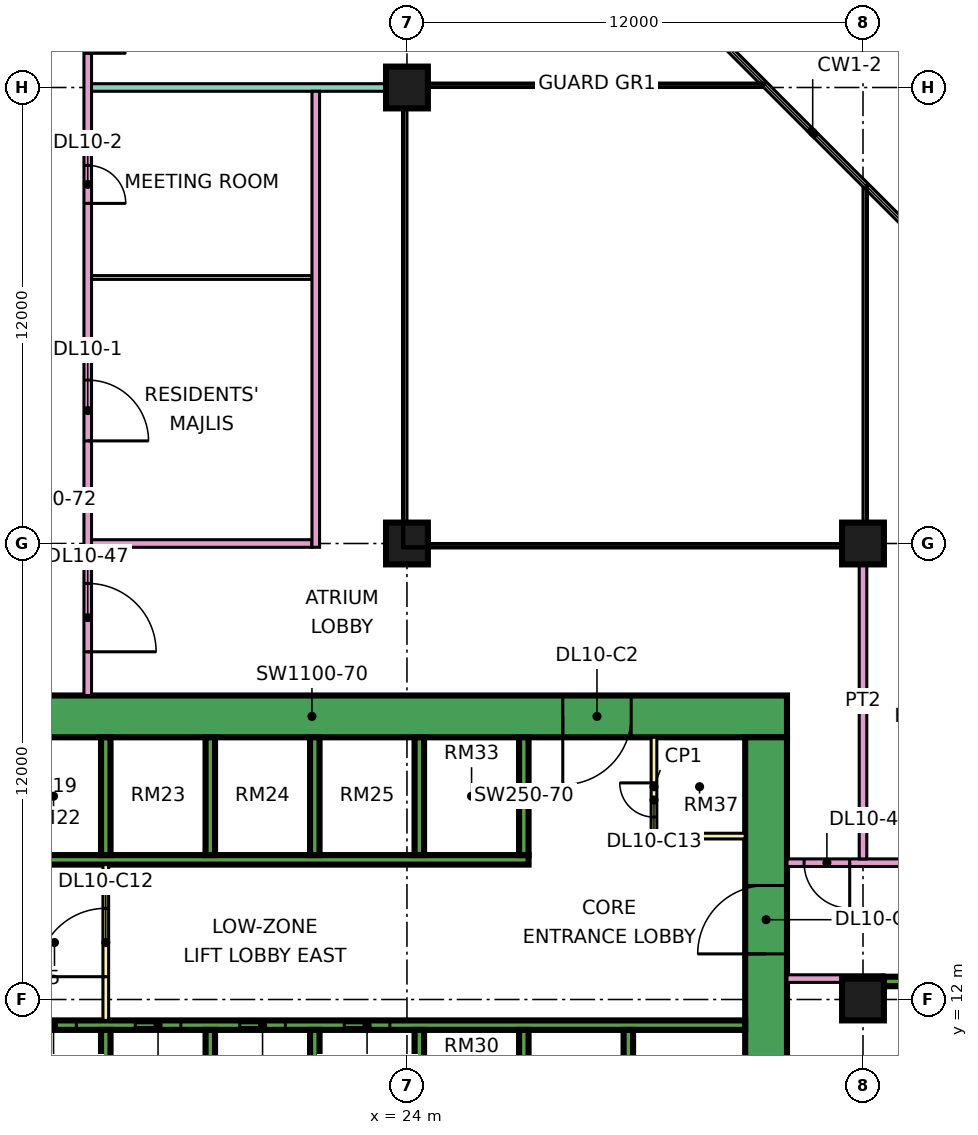
"""IFC4 building model, lengths in metres.
Left out: names, types, materials, properties, quantities, classifications, styles, units other than length and angle.
Written with IfcOpenShell. Run it as: python <this file> out.ifc"""

import sys

from ifc_helpers import new_model, si_unit, direction, frame, frame_2d, origin, origin_2d, place, context, subcontext, project, spatial, rectangle, extrude, element, fill, save


model = new_model("IFC4")
c1 = context("Model", 3, precision=1e-05, world=origin(), true_north=direction((0.0, 1.0)))
c2 = subcontext(c1, "Body", "Model", "MODEL_VIEW")
j1 = project(units=[si_unit("LENGTHUNIT", "METRE"), si_unit("PLANEANGLEUNIT", "RADIAN")], contexts=[c1])
p1 = place(None, origin())
s1 = spatial("IfcSite", under=j1, at=p1, CompositionType="ELEMENT")
p2 = place(p1, origin())
s2 = spatial("IfcBuilding", under=s1, at=p2, CompositionType="ELEMENT")
p3 = place(p2, frame((0.0, 0.0, 52.65)))
s3 = spatial("IfcBuildingStorey", under=s2, at=p3, CompositionType="ELEMENT", Elevation=52.65)
for number, where, z_axis, x_axis in (
    (1, (24.0, 24.0, 0.0), (0.0, 0.0, 1.0), (1.0, 0.0, 0.0)),
    (2, (24.0, 36.0, 0.0), (0.0, 0.0, 1.0), (1.0, 0.0, 0.0)),
    (3, (36.0, 12.0, 0.0), (0.0, 0.0, 1.0), (1.0, 0.0, 0.0)),
    (4, (36.0, 24.0, 0.0), (0.0, 0.0, 1.0), (1.0, 0.0, 0.0)),
):
    element("IfcColumn", number, at=place(p3, frame(where, z_axis=z_axis, x_axis=x_axis)), inside=s3, PredefinedType="COLUMN", context=c2, shape_type="SweptSolid", body=[
        extrude(rectangle(XDim=1.1, YDim=1.1, at=origin_2d()), origin(), (0.0, 0.0, 1.0), 3.75),
    ])
p4 = place(p3, frame((9.0, 19.45, 0.0), z_axis=(0.0, 0.0, 1.0), x_axis=(1.0, 0.0, 0.0)))
e5 = element("IfcWall", 5, at=p4, inside=s3, PredefinedType="SHEAR", context=c2, shape_type="SweptSolid", body=[
    extrude(rectangle(XDim=25.0, YDim=1.1, at=frame_2d((12.5, 0.0))), origin(), (0.0, 0.0, 1.0), 3.75),
])
p5 = place(p4, frame((19.1, 0.0, 0.0)))
e6 = element("IfcOpeningElement", 6, at=p5, cuts=e5, PredefinedType="OPENING", context=c2, shape_type="SweptSolid", body=[
    extrude(rectangle(XDim=1.8, YDim=2.4, at=frame_2d((0.9, 1.2))), frame((0.0, 0.56, 0.0), z_axis=(0.0, -1.0, 0.0), x_axis=(1.0, 0.0, 0.0)), (0.0, 0.0, 1.0), 1.12),
])
p6 = place(p3, frame((33.45, 8.1, 0.0), z_axis=(0.0, 0.0, 1.0), x_axis=(0.0, 1.0, 0.0)))
e7 = element("IfcWall", 7, at=p6, inside=s3, PredefinedType="SHEAR", context=c2, shape_type="SweptSolid", body=[
    extrude(rectangle(XDim=10.8, YDim=1.1, at=frame_2d((5.4, 0.0))), origin(), (0.0, 0.0, 1.0), 3.75),
])
p7 = place(p6, frame((5.1, 0.0, 0.0)))
e8 = element("IfcOpeningElement", 8, at=p7, cuts=e7, PredefinedType="OPENING", context=c2, shape_type="SweptSolid", body=[
    extrude(rectangle(XDim=1.8, YDim=2.4, at=frame_2d((0.9, 1.2))), frame((0.0, 0.56, 0.0), z_axis=(0.0, -1.0, 0.0), x_axis=(1.0, 0.0, 0.0)), (0.0, 0.0, 1.0), 1.12),
])
p8 = place(p3, frame((13.45, 11.325, 0.0), z_axis=(0.0, 0.0, 1.0), x_axis=(1.0, 0.0, 0.0)))
e9 = element("IfcWall", 9, at=p8, inside=s3, PredefinedType="SHEAR", context=c2, shape_type="SweptSolid", body=[
    extrude(rectangle(XDim=19.45, YDim=0.25, at=frame_2d((9.725, 0.0))), origin(), (0.0, 0.0, 1.0), 3.75),
])
p9 = place(p8, frame((0.65, 0.0, 0.0)))
e10 = element("IfcOpeningElement", 10, at=p9, cuts=e9, PredefinedType="OPENING", context=c2, shape_type="SweptSolid", body=[
    extrude(rectangle(XDim=1.2, YDim=2.2, at=frame_2d((0.6, 1.1))), frame((0.0, 0.135, 0.0), z_axis=(0.0, -1.0, 0.0), x_axis=(1.0, 0.0, 0.0)), (0.0, 0.0, 1.0), 0.27),
])
p10 = place(p8, frame((3.4, 0.0, 0.0)))
e11 = element("IfcOpeningElement", 11, at=p10, cuts=e9, PredefinedType="OPENING", context=c2, shape_type="SweptSolid", body=[
    extrude(rectangle(XDim=1.2, YDim=2.2, at=frame_2d((0.6, 1.1))), frame((0.0, 0.135, 0.0), z_axis=(0.0, -1.0, 0.0), x_axis=(1.0, 0.0, 0.0)), (0.0, 0.0, 1.0), 0.27),
])
p11 = place(p8, frame((6.15, 0.0, 0.0)))
e12 = element("IfcOpeningElement", 12, at=p11, cuts=e9, PredefinedType="OPENING", context=c2, shape_type="SweptSolid", body=[
    extrude(rectangle(XDim=1.2, YDim=2.2, at=frame_2d((0.6, 1.1))), frame((0.0, 0.135, 0.0), z_axis=(0.0, -1.0, 0.0), x_axis=(1.0, 0.0, 0.0)), (0.0, 0.0, 1.0), 0.27),
])
p12 = place(p8, frame((8.9, 0.0, 0.0)))
e13 = element("IfcOpeningElement", 13, at=p12, cuts=e9, PredefinedType="OPENING", context=c2, shape_type="SweptSolid", body=[
    extrude(rectangle(XDim=1.2, YDim=2.2, at=frame_2d((0.6, 1.1))), frame((0.0, 0.135, 0.0), z_axis=(0.0, -1.0, 0.0), x_axis=(1.0, 0.0, 0.0)), (0.0, 0.0, 1.0), 0.27),
])
p13 = place(p3, frame((13.45, 15.675, 0.0), z_axis=(0.0, 0.0, 1.0), x_axis=(1.0, 0.0, 0.0)))
e14 = element("IfcWall", 14, at=p13, inside=s3, PredefinedType="SHEAR", context=c2, shape_type="SweptSolid", body=[
    extrude(rectangle(XDim=13.75, YDim=0.25, at=frame_2d((6.875, 0.0))), origin(), (0.0, 0.0, 1.0), 3.75),
])
for number, where, z_axis, x_axis in (
    (15, (16.075, 8.1, 0.0), (0.0, 0.0, 1.0), (0.0, 1.0, 0.0)),
    (16, (18.825, 8.1, 0.0), (0.0, 0.0, 1.0), (0.0, 1.0, 0.0)),
    (17, (21.575, 8.1, 0.0), (0.0, 0.0, 1.0), (0.0, 1.0, 0.0)),
    (18, (24.325, 8.1, 0.0), (0.0, 0.0, 1.0), (0.0, 1.0, 0.0)),
    (19, (27.075, 8.1, 0.0), (0.0, 0.0, 1.0), (0.0, 1.0, 0.0)),
    (20, (29.825, 8.1, 0.0), (0.0, 0.0, 1.0), (0.0, 1.0, 0.0)),
    (21, (16.075, 15.8, 0.0), (0.0, 0.0, 1.0), (0.0, 1.0, 0.0)),
    (22, (18.825, 15.8, 0.0), (0.0, 0.0, 1.0), (0.0, 1.0, 0.0)),
    (23, (21.575, 15.8, 0.0), (0.0, 0.0, 1.0), (0.0, 1.0, 0.0)),
    (24, (24.325, 15.8, 0.0), (0.0, 0.0, 1.0), (0.0, 1.0, 0.0)),
    (25, (27.075, 15.8, 0.0), (0.0, 0.0, 1.0), (0.0, 1.0, 0.0)),
):
    element("IfcWall", number, at=place(p3, frame(where, z_axis=z_axis, x_axis=x_axis)), inside=s3, PredefinedType="SHEAR", context=c2, shape_type="SweptSolid", body=[
        extrude(rectangle(XDim=3.1, YDim=0.25, at=frame_2d((1.55, 0.0))), origin(), (0.0, 0.0, 1.0), 3.75),
    ])
p14 = place(p3, frame((36.55, 12.475, 0.0), z_axis=(0.0, 0.0, 1.0), x_axis=(1.0, 0.0, 0.0)))
e26 = element("IfcWall", 26, at=p14, inside=s3, PredefinedType="SHEAR", context=c2, shape_type="SweptSolid", body=[
    extrude(rectangle(XDim=4.1, YDim=0.25, at=frame_2d((2.05, 0.0))), origin(), (0.0, 0.0, 1.0), 3.75),
])
p15 = place(p14, frame((1.825, 0.0, 0.0)))
e27 = element("IfcOpeningElement", 27, at=p15, cuts=e26, PredefinedType="OPENING", context=c2, shape_type="SweptSolid", body=[
    extrude(rectangle(XDim=1.1, YDim=2.2, at=frame_2d((0.55, 1.1))), frame((0.0, 0.135, 0.0), z_axis=(0.0, -1.0, 0.0), x_axis=(1.0, 0.0, 0.0)), (0.0, 0.0, 1.0), 0.27),
])
p16 = place(p3, frame((16.075, 11.45, 0.0), z_axis=(0.0, 0.0, 1.0), x_axis=(0.0, 1.0, 0.0)))
e28 = element("IfcWall", 28, at=p16, inside=s3, PredefinedType="PARTITIONING", context=c2, shape_type="SweptSolid", body=[
    extrude(rectangle(XDim=4.1, YDim=0.15, at=frame_2d((2.05, 0.0))), origin(), (0.0, 0.0, 1.0), 3.35),
])
p17 = place(p16, frame((1.15, 0.0, 0.0)))
e29 = element("IfcOpeningElement", 29, at=p17, cuts=e28, PredefinedType="OPENING", context=c2, shape_type="SweptSolid", body=[
    extrude(rectangle(XDim=1.8, YDim=2.4, at=frame_2d((0.9, 1.2))), frame((0.0, 0.085, 0.0), z_axis=(0.0, -1.0, 0.0), x_axis=(1.0, 0.0, 0.0)), (0.0, 0.0, 1.0), 0.17),
])
p18 = place(p3, frame((30.5, 16.3, 0.0), z_axis=(0.0, 0.0, 1.0), x_axis=(0.0, 1.0, 0.0)))
e30 = element("IfcWall", 30, at=p18, inside=s3, PredefinedType="PARTITIONING", context=c2, shape_type="SweptSolid", body=[
    extrude(rectangle(XDim=2.6, YDim=0.15, at=frame_2d((1.3, 0.0))), origin(), (0.0, 0.0, 1.0), 3.35),
])
p19 = place(p18, frame((0.5, 0.0, 0.0)))
e31 = element("IfcOpeningElement", 31, at=p19, cuts=e30, PredefinedType="OPENING", context=c2, shape_type="SweptSolid", body=[
    extrude(rectangle(XDim=0.9, YDim=2.1, at=frame_2d((0.45, 1.05))), frame((0.0, 0.085, 0.0), z_axis=(0.0, -1.0, 0.0), x_axis=(1.0, 0.0, 0.0)), (0.0, 0.0, 1.0), 0.17),
])
p20 = place(p3, frame((30.5, 16.3, 0.0), z_axis=(0.0, 0.0, 1.0), x_axis=(1.0, 0.0, 0.0)))
e32 = element("IfcWall", 32, at=p20, inside=s3, PredefinedType="PARTITIONING", context=c2, shape_type="SweptSolid", body=[
    extrude(rectangle(XDim=2.4, YDim=0.15, at=frame_2d((1.2, 0.0))), origin(), (0.0, 0.0, 1.0), 3.35),
])
p21 = place(p3, frame((15.6, 20.0, 0.0), z_axis=(0.0, 0.0, 1.0), x_axis=(0.0, 1.0, 0.0)))
e33 = element("IfcWall", 33, at=p21, inside=s3, PredefinedType="PARTITIONING", context=c2, shape_type="SweptSolid", body=[
    extrude(rectangle(XDim=27.775, YDim=0.2, at=frame_2d((13.887, 0.0))), origin(), (0.0, 0.0, 1.0), 3.35),
])
p22 = place(p21, frame((6.7, 0.0, 0.0)))
e34 = element("IfcOpeningElement", 34, at=p22, cuts=e33, PredefinedType="OPENING", context=c2, shape_type="SweptSolid", body=[
    extrude(rectangle(XDim=1.6, YDim=2.1, at=frame_2d((0.8, 1.05))), frame((0.0, 0.11, 0.0), z_axis=(0.0, -1.0, 0.0), x_axis=(1.0, 0.0, 0.0)), (0.0, 0.0, 1.0), 0.22),
])
p23 = place(p21, frame((12.95, 0.0, 0.0)))
e35 = element("IfcOpeningElement", 35, at=p23, cuts=e33, PredefinedType="OPENING", context=c2, shape_type="SweptSolid", body=[
    extrude(rectangle(XDim=1.0, YDim=2.1, at=frame_2d((0.5, 1.05))), frame((0.0, 0.11, 0.0), z_axis=(0.0, -1.0, 0.0), x_axis=(1.0, 0.0, 0.0)), (0.0, 0.0, 1.0), 0.22),
])
p24 = place(p21, frame((16.9, 0.0, 0.0)))
e36 = element("IfcOpeningElement", 36, at=p24, cuts=e33, PredefinedType="OPENING", context=c2, shape_type="SweptSolid", body=[
    extrude(rectangle(XDim=1.0, YDim=2.1, at=frame_2d((0.5, 1.05))), frame((0.0, 0.11, 0.0), z_axis=(0.0, -1.0, 0.0), x_axis=(1.0, 0.0, 0.0)), (0.0, 0.0, 1.0), 0.22),
])
p25 = place(p21, frame((1.15, 0.0, 0.0)))
e37 = element("IfcOpeningElement", 37, at=p25, cuts=e33, PredefinedType="OPENING", context=c2, shape_type="SweptSolid", body=[
    extrude(rectangle(XDim=1.8, YDim=2.1, at=frame_2d((0.9, 1.05))), frame((0.0, 0.11, 0.0), z_axis=(0.0, -1.0, 0.0), x_axis=(1.0, 0.0, 0.0)), (0.0, 0.0, 1.0), 0.22),
])
p26 = place(p21, frame((25.9, 0.0, 0.0)))
e38 = element("IfcOpeningElement", 38, at=p26, cuts=e33, PredefinedType="OPENING", context=c2, shape_type="SweptSolid", body=[
    extrude(rectangle(XDim=1.0, YDim=2.1, at=frame_2d((0.5, 1.05))), frame((0.0, 0.11, 0.0), z_axis=(0.0, -1.0, 0.0), x_axis=(1.0, 0.0, 0.0)), (0.0, 0.0, 1.0), 0.22),
])
p27 = place(p3, frame((15.7, 24.0, 0.0), z_axis=(0.0, 0.0, 1.0), x_axis=(1.0, 0.0, 0.0)))
e39 = element("IfcWall", 39, at=p27, inside=s3, PredefinedType="PARTITIONING", context=c2, shape_type="SweptSolid", body=[
    extrude(rectangle(XDim=5.8, YDim=0.2, at=frame_2d((2.9, 0.0))), origin(), (0.0, 0.0, 1.0), 3.35),
])
p28 = place(p3, frame((15.7, 31.0, 0.0), z_axis=(0.0, 0.0, 1.0), x_axis=(1.0, 0.0, 0.0)))
e40 = element("IfcWall", 40, at=p28, inside=s3, PredefinedType="PARTITIONING", context=c2, shape_type="SweptSolid", body=[
    extrude(rectangle(XDim=5.8, YDim=0.1, at=frame_2d((2.9, 0.0))), origin(), (0.0, 0.0, 1.0), 3.35),
])
p29 = place(p3, frame((15.7, 36.0, 0.0), z_axis=(0.0, 0.0, 1.0), x_axis=(1.0, 0.0, 0.0)))
e41 = element("IfcWall", 41, at=p29, inside=s3, PredefinedType="PARTITIONING", context=c2, shape_type="SweptSolid", body=[
    extrude(rectangle(XDim=8.3, YDim=0.2, at=frame_2d((4.15, 0.0))), origin(), (0.0, 0.0, 1.0), 3.35),
])
p30 = place(p3, frame((21.6, 23.9, 0.0), z_axis=(0.0, 0.0, 1.0), x_axis=(0.0, 1.0, 0.0)))
e42 = element("IfcWall", 42, at=p30, inside=s3, PredefinedType="PARTITIONING", context=c2, shape_type="SweptSolid", body=[
    extrude(rectangle(XDim=12.0, YDim=0.2, at=frame_2d((6.0, 0.0))), origin(), (0.0, 0.0, 1.0), 3.35),
])
p31 = place(p3, frame((34.0, 12.55, 0.0), z_axis=(0.0, 0.0, 1.0), x_axis=(1.0, 0.0, 0.0)))
e43 = element("IfcWall", 43, at=p31, inside=s3, PredefinedType="PARTITIONING", context=c2, shape_type="SweptSolid", body=[
    extrude(rectangle(XDim=2.551, YDim=0.2, at=frame_2d((1.275, 0.0))), origin(), (0.0, 0.0, 1.0), 3.35),
])
p32 = place(p3, frame((34.0, 15.6, 0.0), z_axis=(0.0, 0.0, 1.0), x_axis=(1.0, 0.0, 0.0)))
e44 = element("IfcWall", 44, at=p32, inside=s3, PredefinedType="PARTITIONING", context=c2, shape_type="SweptSolid", body=[
    extrude(rectangle(XDim=10.35, YDim=0.2, at=frame_2d((5.175, 0.0))), origin(), (0.0, 0.0, 1.0), 3.35),
])
p33 = place(p32, frame((5.6, 0.0, 0.0)))
e45 = element("IfcOpeningElement", 45, at=p33, cuts=e44, PredefinedType="OPENING", context=c2, shape_type="SweptSolid", body=[
    extrude(rectangle(XDim=1.0, YDim=2.1, at=frame_2d((0.5, 1.05))), frame((0.0, 0.11, 0.0), z_axis=(0.0, -1.0, 0.0), x_axis=(1.0, 0.0, 0.0)), (0.0, 0.0, 1.0), 0.22),
])
p34 = place(p32, frame((0.45, 0.0, 0.0)))
e46 = element("IfcOpeningElement", 46, at=p34, cuts=e44, PredefinedType="OPENING", context=c2, shape_type="SweptSolid", body=[
    extrude(rectangle(XDim=1.2, YDim=2.1, at=frame_2d((0.6, 1.05))), frame((0.0, 0.11, 0.0), z_axis=(0.0, -1.0, 0.0), x_axis=(1.0, 0.0, 0.0)), (0.0, 0.0, 1.0), 0.22),
])
p35 = place(p3, frame((36.0, 15.7, 0.0), z_axis=(0.0, 0.0, 1.0), x_axis=(0.0, 1.0, 0.0)))
e47 = element("IfcWall", 47, at=p35, inside=s3, PredefinedType="PARTITIONING", context=c2, shape_type="SweptSolid", body=[
    extrude(rectangle(XDim=8.3, YDim=0.2, at=frame_2d((4.15, 0.0))), origin(), (0.0, 0.0, 1.0), 3.35),
])
p36 = place(p9, origin())
e48 = element("IfcDoor", 48, at=p36, inside=s3, OperationType="DOUBLE_DOOR_SLIDING", PredefinedType="DOOR", context=c2, shape_type="SweptSolid", body=[
    extrude(rectangle(XDim=1.2, YDim=2.2, at=frame_2d((0.6, 1.1))), frame((0.0, 0.025, 0.0), z_axis=(0.0, -1.0, 0.0), x_axis=(1.0, 0.0, 0.0)), (0.0, 0.0, 1.0), 0.05),
])
fill(e10, e48)
p37 = place(p10, origin())
e49 = element("IfcDoor", 49, at=p37, inside=s3, OperationType="DOUBLE_DOOR_SLIDING", PredefinedType="DOOR", context=c2, shape_type="SweptSolid", body=[
    extrude(rectangle(XDim=1.2, YDim=2.2, at=frame_2d((0.6, 1.1))), frame((0.0, 0.025, 0.0), z_axis=(0.0, -1.0, 0.0), x_axis=(1.0, 0.0, 0.0)), (0.0, 0.0, 1.0), 0.05),
])
fill(e11, e49)
p38 = place(p11, origin())
e50 = element("IfcDoor", 50, at=p38, inside=s3, OperationType="DOUBLE_DOOR_SLIDING", PredefinedType="DOOR", context=c2, shape_type="SweptSolid", body=[
    extrude(rectangle(XDim=1.2, YDim=2.2, at=frame_2d((0.6, 1.1))), frame((0.0, 0.025, 0.0), z_axis=(0.0, -1.0, 0.0), x_axis=(1.0, 0.0, 0.0)), (0.0, 0.0, 1.0), 0.05),
])
fill(e12, e50)
p39 = place(p12, origin())
e51 = element("IfcDoor", 51, at=p39, inside=s3, OperationType="DOUBLE_DOOR_SLIDING", PredefinedType="DOOR", context=c2, shape_type="SweptSolid", body=[
    extrude(rectangle(XDim=1.2, YDim=2.2, at=frame_2d((0.6, 1.1))), frame((0.0, 0.025, 0.0), z_axis=(0.0, -1.0, 0.0), x_axis=(1.0, 0.0, 0.0)), (0.0, 0.0, 1.0), 0.05),
])
fill(e13, e51)
p40 = place(p7, origin())
e52 = element("IfcDoor", 52, at=p40, inside=s3, OperationType="DOUBLE_DOOR_SINGLE_SWING", PredefinedType="DOOR", context=c2, shape_type="SweptSolid", body=[
    extrude(rectangle(XDim=1.8, YDim=2.4, at=frame_2d((0.9, 1.2))), frame((0.0, 0.025, 0.0), z_axis=(0.0, -1.0, 0.0), x_axis=(1.0, 0.0, 0.0)), (0.0, 0.0, 1.0), 0.05),
])
fill(e8, e52)
p41 = place(p5, frame((1.8, 0.0, 0.0), z_axis=(0.0, 0.0, 1.0), x_axis=(-1.0, 0.0, 0.0)))
e53 = element("IfcDoor", 53, at=p41, inside=s3, OperationType="DOUBLE_DOOR_SINGLE_SWING", PredefinedType="DOOR", context=c2, shape_type="SweptSolid", body=[
    extrude(rectangle(XDim=1.8, YDim=2.4, at=frame_2d((0.9, 1.2))), frame((0.0, 0.025, 0.0), z_axis=(0.0, -1.0, 0.0), x_axis=(1.0, 0.0, 0.0)), (0.0, 0.0, 1.0), 0.05),
])
fill(e6, e53)
p42 = place(p17, origin())
e54 = element("IfcDoor", 54, at=p42, inside=s3, OperationType="DOUBLE_DOOR_SINGLE_SWING", PredefinedType="DOOR", context=c2, shape_type="SweptSolid", body=[
    extrude(rectangle(XDim=1.8, YDim=2.4, at=frame_2d((0.9, 1.2))), frame((0.0, 0.025, 0.0), z_axis=(0.0, -1.0, 0.0), x_axis=(1.0, 0.0, 0.0)), (0.0, 0.0, 1.0), 0.05),
])
fill(e29, e54)
p43 = place(p19, frame((0.9, 0.0, 0.0), z_axis=(0.0, 0.0, 1.0), x_axis=(-1.0, 0.0, 0.0)))
e55 = element("IfcDoor", 55, at=p43, inside=s3, OperationType="SINGLE_SWING_RIGHT", PredefinedType="DOOR", context=c2, shape_type="SweptSolid", body=[
    extrude(rectangle(XDim=0.9, YDim=2.1, at=frame_2d((0.45, 1.05))), frame((0.0, 0.025, 0.0), z_axis=(0.0, -1.0, 0.0), x_axis=(1.0, 0.0, 0.0)), (0.0, 0.0, 1.0), 0.05),
])
fill(e31, e55)
p44 = place(p22, frame((1.6, 0.0, 0.0), z_axis=(0.0, 0.0, 1.0), x_axis=(-1.0, 0.0, 0.0)))
e56 = element("IfcDoor", 56, at=p44, inside=s3, OperationType="DOUBLE_DOOR_SINGLE_SWING", PredefinedType="DOOR", context=c2, shape_type="SweptSolid", body=[
    extrude(rectangle(XDim=1.6, YDim=2.1, at=frame_2d((0.8, 1.05))), frame((0.0, 0.025, 0.0), z_axis=(0.0, -1.0, 0.0), x_axis=(1.0, 0.0, 0.0)), (0.0, 0.0, 1.0), 0.05),
])
fill(e34, e56)
p45 = place(p23, frame((1.0, 0.0, 0.0), z_axis=(0.0, 0.0, 1.0), x_axis=(-1.0, 0.0, 0.0)))
e57 = element("IfcDoor", 57, at=p45, inside=s3, OperationType="SINGLE_SWING_LEFT", PredefinedType="DOOR", context=c2, shape_type="SweptSolid", body=[
    extrude(rectangle(XDim=1.0, YDim=2.1, at=frame_2d((0.5, 1.05))), frame((0.0, 0.025, 0.0), z_axis=(0.0, -1.0, 0.0), x_axis=(1.0, 0.0, 0.0)), (0.0, 0.0, 1.0), 0.05),
])
fill(e35, e57)
p46 = place(p24, frame((1.0, 0.0, 0.0), z_axis=(0.0, 0.0, 1.0), x_axis=(-1.0, 0.0, 0.0)))
e58 = element("IfcDoor", 58, at=p46, inside=s3, OperationType="SINGLE_SWING_LEFT", PredefinedType="DOOR", context=c2, shape_type="SweptSolid", body=[
    extrude(rectangle(XDim=1.0, YDim=2.1, at=frame_2d((0.5, 1.05))), frame((0.0, 0.025, 0.0), z_axis=(0.0, -1.0, 0.0), x_axis=(1.0, 0.0, 0.0)), (0.0, 0.0, 1.0), 0.05),
])
fill(e36, e58)
p47 = place(p34, origin())
e59 = element("IfcDoor", 59, at=p47, inside=s3, OperationType="SINGLE_SWING_RIGHT", PredefinedType="DOOR", context=c2, shape_type="SweptSolid", body=[
    extrude(rectangle(XDim=1.2, YDim=2.1, at=frame_2d((0.6, 1.05))), frame((0.0, 0.025, 0.0), z_axis=(0.0, -1.0, 0.0), x_axis=(1.0, 0.0, 0.0)), (0.0, 0.0, 1.0), 0.05),
])
fill(e46, e59)
p48 = place(p25, frame((1.8, 0.0, 0.0), z_axis=(0.0, 0.0, 1.0), x_axis=(-1.0, 0.0, 0.0)))
e60 = element("IfcDoor", 60, at=p48, inside=s3, OperationType="DOUBLE_DOOR_SINGLE_SWING", PredefinedType="DOOR", context=c2, shape_type="SweptSolid", body=[
    extrude(rectangle(XDim=1.8, YDim=2.1, at=frame_2d((0.9, 1.05))), frame((0.0, 0.025, 0.0), z_axis=(0.0, -1.0, 0.0), x_axis=(1.0, 0.0, 0.0)), (0.0, 0.0, 1.0), 0.05),
])
fill(e37, e60)
save(model, sys.argv[1])
